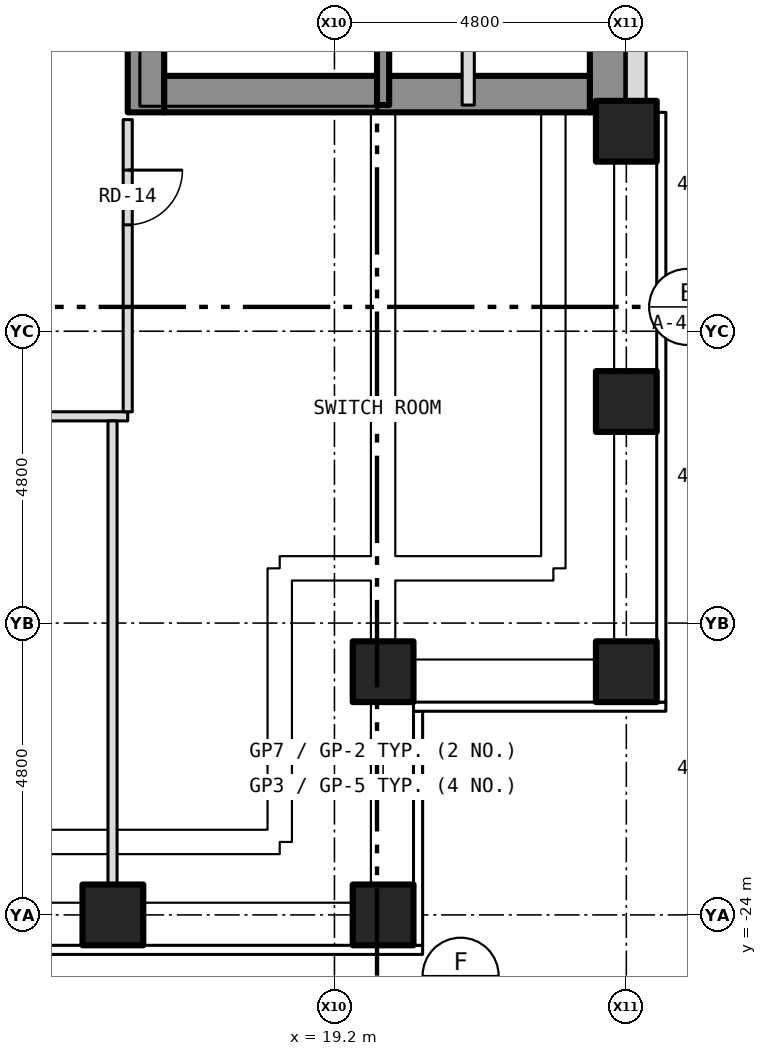
"""IFC4 building model, lengths in metres.
Left out: names, types, materials, properties, quantities, classifications, styles, units other than length and angle.
Written with IfcOpenShell. Run it as: python <this file> out.ifc"""

import sys

from ifc_helpers import new_model, si_unit, direction, frame, frame_2d, origin, origin_2d, place, context, subcontext, project, spatial, rectangle, hollow_rectangle, extrude, element, fill, save


model = new_model("IFC4")
c1 = context("Model", 3, precision=1e-05, world=origin(), true_north=direction((0.0, 1.0)))
c2 = subcontext(c1, "Body", "Model", "MODEL_VIEW")
j1 = project(units=[si_unit("LENGTHUNIT", "METRE"), si_unit("PLANEANGLEUNIT", "RADIAN")], contexts=[c1])
p1 = place(None, origin())
s1 = spatial("IfcSite", under=j1, at=p1, CompositionType="ELEMENT")
p2 = place(p1, origin())
s2 = spatial("IfcBuilding", under=s1, at=p2, CompositionType="ELEMENT")
p3 = place(p2, frame((0.0, 0.0, 84.5)))
s3 = spatial("IfcBuildingStorey", under=s2, at=p3, CompositionType="ELEMENT", Elevation=84.5)
for number, where, z_axis, x_axis in (
    (1, (15.556, -24.0, -0.3), (0.0, 0.0, 1.0), (1.0, 0.0, 0.0)),
    (2, (20.0, -24.0, -0.3), (0.0, 0.0, 1.0), (1.0, 0.0, 0.0)),
    (3, (24.0, -20.0, -0.3), (0.0, 0.0, 1.0), (1.0, 0.0, 0.0)),
    (4, (24.0, -15.556, -0.3), (0.0, 0.0, 1.0), (1.0, 0.0, 0.0)),
    (5, (24.0, -11.111, -0.3), (0.0, 0.0, 1.0), (1.0, 0.0, 0.0)),
    (6, (20.0, -20.0, -0.3), (0.0, 0.0, 1.0), (1.0, 0.0, 0.0)),
):
    element("IfcColumn", number, at=place(p3, frame(where, z_axis=z_axis, x_axis=x_axis)), inside=s3, PredefinedType="COLUMN", context=c2, shape_type="SweptSolid", body=[
        extrude(hollow_rectangle(XDim=1.0, YDim=1.0, WallThickness=0.06, at=origin_2d()), origin(), (0.0, 0.0, 1.0), 4.65),
    ])
p4 = place(p3, frame((16.1, -10.8, 0.0), z_axis=(0.0, 0.0, 1.0), x_axis=(0.0, 1.0, 0.0)))
e7 = element("IfcWall", 7, at=p4, inside=s3, PredefinedType="SHEAR", context=c2, shape_type="SweptSolid", body=[
    extrude(rectangle(XDim=21.6, YDim=0.6, at=frame_2d((10.8, 0.0))), origin(), (0.0, 0.0, 1.0), 3.9),
])
p5 = place(p4, frame((9.4, 0.0, 0.0)))
e8 = element("IfcOpeningElement", 8, at=p5, cuts=e7, PredefinedType="OPENING", context=c2, shape_type="SweptSolid", body=[
    extrude(rectangle(XDim=1.1, YDim=2.1, at=frame_2d((0.55, 1.05))), frame((0.0, 0.312, 0.0), z_axis=(0.0, -1.0, 0.0), x_axis=(1.0, 0.0, 0.0)), (0.0, 0.0, 1.0), 0.624),
])
p6 = place(p4, frame((11.5, 0.0, 0.0)))
e9 = element("IfcOpeningElement", 9, at=p6, cuts=e7, PredefinedType="OPENING", context=c2, shape_type="SweptSolid", body=[
    extrude(rectangle(XDim=1.1, YDim=2.1, at=frame_2d((0.55, 1.05))), frame((0.0, 0.312, 0.0), z_axis=(0.0, -1.0, 0.0), x_axis=(1.0, 0.0, 0.0)), (0.0, 0.0, 1.0), 0.624),
])
p7 = place(p4, frame((13.6, 0.0, 0.0)))
e10 = element("IfcOpeningElement", 10, at=p7, cuts=e7, PredefinedType="OPENING", context=c2, shape_type="SweptSolid", body=[
    extrude(rectangle(XDim=1.1, YDim=2.1, at=frame_2d((0.55, 1.05))), frame((0.0, 0.312, 0.0), z_axis=(0.0, -1.0, 0.0), x_axis=(1.0, 0.0, 0.0)), (0.0, 0.0, 1.0), 0.624),
])
p8 = place(p4, frame((15.7, 0.0, 0.0)))
e11 = element("IfcOpeningElement", 11, at=p8, cuts=e7, PredefinedType="OPENING", context=c2, shape_type="SweptSolid", body=[
    extrude(rectangle(XDim=1.1, YDim=2.1, at=frame_2d((0.55, 1.05))), frame((0.0, 0.312, 0.0), z_axis=(0.0, -1.0, 0.0), x_axis=(1.0, 0.0, 0.0)), (0.0, 0.0, 1.0), 0.624),
])
p9 = place(p4, frame((17.8, 0.0, 0.0)))
e12 = element("IfcOpeningElement", 12, at=p9, cuts=e7, PredefinedType="OPENING", context=c2, shape_type="SweptSolid", body=[
    extrude(rectangle(XDim=1.1, YDim=2.1, at=frame_2d((0.55, 1.05))), frame((0.0, 0.312, 0.0), z_axis=(0.0, -1.0, 0.0), x_axis=(1.0, 0.0, 0.0)), (0.0, 0.0, 1.0), 0.624),
])
p10 = place(p4, frame((5.642, 0.0, 0.0)))
e13 = element("IfcOpeningElement", 13, at=p10, cuts=e7, PredefinedType="OPENING", context=c2, shape_type="SweptSolid", body=[
    extrude(rectangle(XDim=1.1, YDim=2.1, at=frame_2d((0.55, 1.05))), frame((0.0, 0.312, 0.0), z_axis=(0.0, -1.0, 0.0), x_axis=(1.0, 0.0, 0.0)), (0.0, 0.0, 1.0), 0.624),
])
p11 = place(p4, frame((7.5, 0.0, 0.0)))
e14 = element("IfcOpeningElement", 14, at=p11, cuts=e7, PredefinedType="OPENING", context=c2, shape_type="SweptSolid", body=[
    extrude(rectangle(XDim=1.1, YDim=2.1, at=frame_2d((0.55, 1.05))), frame((0.0, 0.312, 0.0), z_axis=(0.0, -1.0, 0.0), x_axis=(1.0, 0.0, 0.0)), (0.0, 0.0, 1.0), 0.624),
])
p12 = place(p3, frame((23.7, -10.8, 0.0), z_axis=(0.0, 0.0, 1.0), x_axis=(0.0, 1.0, 0.0)))
e15 = element("IfcWall", 15, at=p12, inside=s3, PredefinedType="SHEAR", context=c2, shape_type="SweptSolid", body=[
    extrude(rectangle(XDim=21.6, YDim=0.6, at=frame_2d((10.8, 0.0))), origin(), (0.0, 0.0, 1.0), 3.9),
])
p13 = place(p3, frame((16.4, -10.5, 0.0), z_axis=(0.0, 0.0, 1.0), x_axis=(1.0, 0.0, 0.0)))
e16 = element("IfcWall", 16, at=p13, inside=s3, PredefinedType="SHEAR", context=c2, shape_type="SweptSolid", body=[
    extrude(rectangle(XDim=7.0, YDim=0.6, at=frame_2d((3.5, 0.0))), origin(), (0.0, 0.0, 1.0), 3.9),
])
p14 = place(p3, frame((24.163, -10.8, 0.0), z_axis=(0.0, 0.0, 1.0), x_axis=(0.0, 1.0, 0.0)))
e17 = element("IfcWall", 17, at=p14, inside=s3, PredefinedType="SOLIDWALL", context=c2, shape_type="SweptSolid", body=[
    extrude(rectangle(XDim=21.6, YDim=0.325, at=frame_2d((10.8, 0.0))), origin(), (0.0, 0.0, 1.0), 4.5),
])
p15 = place(p14, frame((3.0, 0.0, 2.2)))
e18 = element("IfcOpeningElement", 18, at=p15, cuts=e17, PredefinedType="OPENING", context=c2, shape_type="SweptSolid", body=[
    extrude(rectangle(XDim=1.2, YDim=0.6, at=frame_2d((0.6, 0.3))), frame((0.0, 0.175, 0.0), z_axis=(0.0, -1.0, 0.0), x_axis=(1.0, 0.0, 0.0)), (0.0, 0.0, 1.0), 0.349),
])
p16 = place(p14, frame((7.8, 0.0, 2.2)))
e19 = element("IfcOpeningElement", 19, at=p16, cuts=e17, PredefinedType="OPENING", context=c2, shape_type="SweptSolid", body=[
    extrude(rectangle(XDim=1.2, YDim=0.6, at=frame_2d((0.6, 0.3))), frame((0.0, 0.175, 0.0), z_axis=(0.0, -1.0, 0.0), x_axis=(1.0, 0.0, 0.0)), (0.0, 0.0, 1.0), 0.349),
])
p17 = place(p14, frame((12.6, 0.0, 2.2)))
e20 = element("IfcOpeningElement", 20, at=p17, cuts=e17, PredefinedType="OPENING", context=c2, shape_type="SweptSolid", body=[
    extrude(rectangle(XDim=1.2, YDim=0.6, at=frame_2d((0.6, 0.3))), frame((0.0, 0.175, 0.0), z_axis=(0.0, -1.0, 0.0), x_axis=(1.0, 0.0, 0.0)), (0.0, 0.0, 1.0), 0.349),
])
p18 = place(p14, frame((17.4, 0.0, 2.2)))
e21 = element("IfcOpeningElement", 21, at=p18, cuts=e17, PredefinedType="OPENING", context=c2, shape_type="SweptSolid", body=[
    extrude(rectangle(XDim=1.2, YDim=0.6, at=frame_2d((0.6, 0.3))), frame((0.0, 0.175, 0.0), z_axis=(0.0, -1.0, 0.0), x_axis=(1.0, 0.0, 0.0)), (0.0, 0.0, 1.0), 0.349),
])
p19 = place(p3, frame((-15.8, -15.8, 0.0), z_axis=(0.0, 0.0, 1.0), x_axis=(1.0, 0.0, 0.0)))
e22 = element("IfcWall", 22, at=p19, inside=s3, PredefinedType="PARTITIONING", context=c2, shape_type="SweptSolid", body=[
    extrude(rectangle(XDim=31.6, YDim=0.15, at=frame_2d((15.8, 0.0))), origin(), (0.0, 0.0, 1.0), 4.35),
])
p20 = place(p19, frame((4.98, 0.0, 0.0)))
e23 = element("IfcOpeningElement", 23, at=p20, cuts=e22, PredefinedType="OPENING", context=c2, shape_type="SweptSolid", body=[
    extrude(rectangle(XDim=0.9, YDim=2.1, at=frame_2d((0.45, 1.05))), frame((0.0, 0.087, 0.0), z_axis=(0.0, -1.0, 0.0), x_axis=(1.0, 0.0, 0.0)), (0.0, 0.0, 1.0), 0.174),
])
p21 = place(p19, frame((15.35, 0.0, 0.0)))
e24 = element("IfcOpeningElement", 24, at=p21, cuts=e22, PredefinedType="OPENING", context=c2, shape_type="SweptSolid", body=[
    extrude(rectangle(XDim=0.9, YDim=2.1, at=frame_2d((0.45, 1.05))), frame((0.0, 0.087, 0.0), z_axis=(0.0, -1.0, 0.0), x_axis=(1.0, 0.0, 0.0)), (0.0, 0.0, 1.0), 0.174),
])
p22 = place(p19, frame((25.721, 0.0, 0.0)))
e25 = element("IfcOpeningElement", 25, at=p22, cuts=e22, PredefinedType="OPENING", context=c2, shape_type="SweptSolid", body=[
    extrude(rectangle(XDim=0.9, YDim=2.1, at=frame_2d((0.45, 1.05))), frame((0.0, 0.087, 0.0), z_axis=(0.0, -1.0, 0.0), x_axis=(1.0, 0.0, 0.0)), (0.0, 0.0, 1.0), 0.174),
])
p23 = place(p3, frame((15.55, -23.88, 0.0), z_axis=(0.0, 0.0, 1.0), x_axis=(0.0, 1.0, 0.0)))
e26 = element("IfcWall", 26, at=p23, inside=s3, PredefinedType="PARTITIONING", context=c2, shape_type="SweptSolid", body=[
    extrude(rectangle(XDim=8.005, YDim=0.15, at=frame_2d((4.002, 0.0))), origin(), (0.0, 0.0, 1.0), 4.35),
])
p24 = place(p3, frame((15.8, -15.725, 0.0), z_axis=(0.0, 0.0, 1.0), x_axis=(0.0, 1.0, 0.0)))
e27 = element("IfcWall", 27, at=p24, inside=s3, PredefinedType="PARTITIONING", context=c2, shape_type="SweptSolid", body=[
    extrude(rectangle(XDim=4.805, YDim=0.15, at=frame_2d((2.403, 0.0))), origin(), (0.0, 0.0, 1.0), 4.35),
])
p25 = place(p24, frame((3.075, 0.0, 0.0)))
e28 = element("IfcOpeningElement", 28, at=p25, cuts=e27, PredefinedType="OPENING", context=c2, shape_type="SweptSolid", body=[
    extrude(rectangle(XDim=0.9, YDim=2.1, at=frame_2d((0.45, 1.05))), frame((0.0, 0.087, 0.0), z_axis=(0.0, -1.0, 0.0), x_axis=(1.0, 0.0, 0.0)), (0.0, 0.0, 1.0), 0.174),
])
p26 = place(p3, frame((20.0, -10.68, 0.0), z_axis=(0.0, 0.0, 1.0), x_axis=(0.0, 1.0, 0.0)))
e29 = element("IfcWall", 29, at=p26, inside=s3, PredefinedType="SHEAR", context=c2, shape_type="SweptSolid", body=[
    extrude(rectangle(XDim=6.98, YDim=0.2, at=frame_2d((3.49, 0.0))), origin(), (0.0, 0.0, 1.0), 3.9),
])
p27 = place(p3, frame((21.4, -10.68, 0.0), z_axis=(0.0, 0.0, 1.0), x_axis=(0.0, 1.0, 0.0)))
e30 = element("IfcWall", 30, at=p27, inside=s3, PredefinedType="PARTITIONING", context=c2, shape_type="SweptSolid", body=[
    extrude(rectangle(XDim=8.68, YDim=0.2, at=frame_2d((4.34, 0.0))), origin(), (0.0, 0.0, 1.0), 3.9),
])
p28 = place(p27, frame((1.655, 0.0, 0.0)))
e31 = element("IfcOpeningElement", 31, at=p28, cuts=e30, PredefinedType="OPENING", context=c2, shape_type="SweptSolid", body=[
    extrude(rectangle(XDim=0.9, YDim=2.1, at=frame_2d((0.45, 1.05))), frame((0.0, 0.112, 0.0), z_axis=(0.0, -1.0, 0.0), x_axis=(1.0, 0.0, 0.0)), (0.0, 0.0, 1.0), 0.224),
])
p29 = place(p27, frame((4.637, 0.0, 0.0)))
e32 = element("IfcOpeningElement", 32, at=p29, cuts=e30, PredefinedType="OPENING", context=c2, shape_type="SweptSolid", body=[
    extrude(rectangle(XDim=0.9, YDim=2.1, at=frame_2d((0.45, 1.05))), frame((0.0, 0.112, 0.0), z_axis=(0.0, -1.0, 0.0), x_axis=(1.0, 0.0, 0.0)), (0.0, 0.0, 1.0), 0.224),
])
p30 = place(p27, frame((6.862, 0.0, 0.0)))
e33 = element("IfcOpeningElement", 33, at=p30, cuts=e30, PredefinedType="OPENING", context=c2, shape_type="SweptSolid", body=[
    extrude(rectangle(XDim=0.9, YDim=2.1, at=frame_2d((0.45, 1.05))), frame((0.0, 0.112, 0.0), z_axis=(0.0, -1.0, 0.0), x_axis=(1.0, 0.0, 0.0)), (0.0, 0.0, 1.0), 0.224),
])
p31 = place(p25, origin())
e34 = element("IfcDoor", 34, at=p31, inside=s3, OperationType="SINGLE_SWING_RIGHT", PredefinedType="DOOR", context=c2, shape_type="SweptSolid", body=[
    extrude(rectangle(XDim=0.9, YDim=2.1, at=frame_2d((0.45, 1.05))), frame((0.0, 0.025, 0.0), z_axis=(0.0, -1.0, 0.0), x_axis=(1.0, 0.0, 0.0)), (0.0, 0.0, 1.0), 0.05),
])
fill(e28, e34)
save(model, sys.argv[1])
